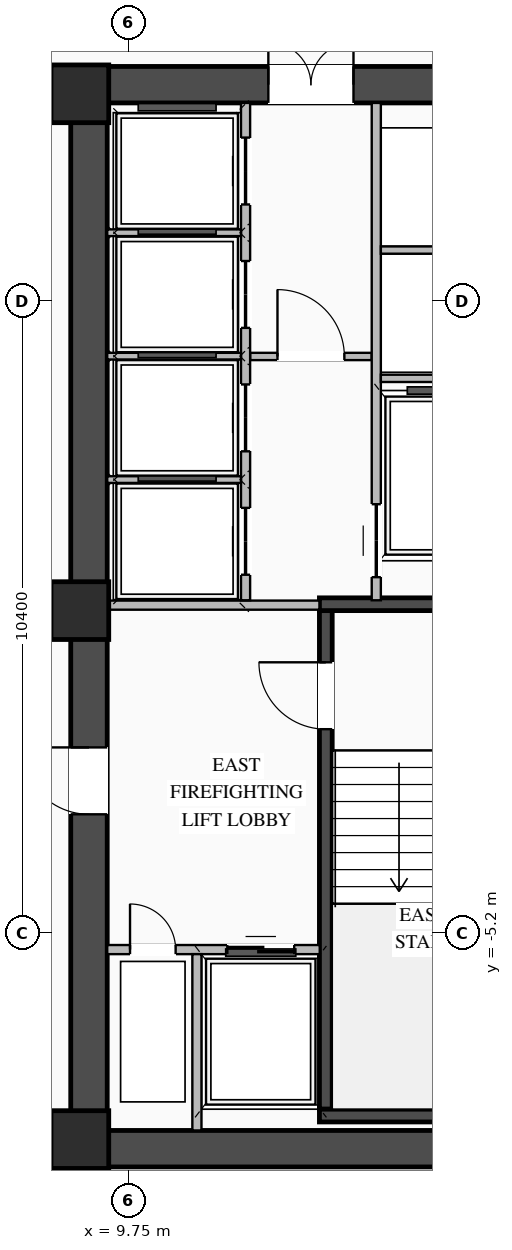
"""IFC4 building model, lengths in metres.
Left out: names, types, materials, properties, quantities, classifications, styles, units other than length and angle.
Written with IfcOpenShell. Run it as: python <this file> out.ifc"""

import sys

from ifc_helpers import new_model, si_unit, direction, frame, frame_2d, origin, origin_2d, place, context, subcontext, project, spatial, rectangle, extrude, element, fill, save


model = new_model("IFC4")
c1 = context("Model", 3, precision=1e-05, world=origin(), true_north=direction((0.0, 1.0)))
c2 = subcontext(c1, "Body", "Model", "MODEL_VIEW")
j1 = project(units=[si_unit("LENGTHUNIT", "METRE"), si_unit("PLANEANGLEUNIT", "RADIAN")], contexts=[c1])
p1 = place(None, origin())
s1 = spatial("IfcSite", under=j1, at=p1, CompositionType="ELEMENT")
p2 = place(p1, origin())
s2 = spatial("IfcBuilding", under=s1, at=p2, CompositionType="ELEMENT")
p3 = place(p2, frame((0.0, 0.0, 131.2)))
s3 = spatial("IfcBuildingStorey", under=s2, at=p3, CompositionType="ELEMENT", Elevation=131.2)
p4 = place(p3, frame((8.8, -8.75, 0.0), z_axis=(0.0, 0.0, 1.0), x_axis=(1.0, 0.0, 0.0)))
e1 = element("IfcWall", 1, at=p4, inside=s3, PredefinedType="SHEAR", context=c2, shape_type="SweptSolid", body=[
    extrude(rectangle(XDim=10.25, YDim=0.6, at=frame_2d((5.125, 0.0))), origin(), (0.0, 0.0, 1.0), 3.27),
])
p5 = place(p3, frame((8.8, 8.75, 0.0), z_axis=(0.0, 0.0, 1.0), x_axis=(1.0, 0.0, 0.0)))
e2 = element("IfcWall", 2, at=p5, inside=s3, PredefinedType="SHEAR", context=c2, shape_type="SweptSolid", body=[
    extrude(rectangle(XDim=10.25, YDim=0.6, at=frame_2d((5.125, 0.0))), origin(), (0.0, 0.0, 1.0), 3.27),
])
p6 = place(p5, frame((3.25, 0.0, 0.0)))
e3 = element("IfcOpeningElement", 3, at=p6, cuts=e2, PredefinedType="OPENING", context=c2, shape_type="SweptSolid", body=[
    extrude(rectangle(XDim=1.4, YDim=2.05, at=frame_2d((0.7, 1.025))), frame((0.0, 0.31, 0.0), z_axis=(0.0, -1.0, 0.0), x_axis=(1.0, 0.0, 0.0)), (0.0, 0.0, 1.0), 0.62),
])
p7 = place(p3, frame((9.1, -8.45, 0.0), z_axis=(0.0, 0.0, 1.0), x_axis=(0.0, 1.0, 0.0)))
e4 = element("IfcWall", 4, at=p7, inside=s3, PredefinedType="SHEAR", context=c2, shape_type="SweptSolid", body=[
    extrude(rectangle(XDim=16.9, YDim=0.6, at=frame_2d((8.45, 0.0))), origin(), (0.0, 0.0, 1.0), 3.27),
])
p8 = place(p7, frame((5.2, 0.0, 0.0)))
e5 = element("IfcOpeningElement", 5, at=p8, cuts=e4, PredefinedType="OPENING", context=c2, shape_type="SweptSolid", body=[
    extrude(rectangle(XDim=1.1, YDim=2.08, at=frame_2d((0.55, 1.04))), frame((0.0, 0.31, 0.0), z_axis=(0.0, -1.0, 0.0), x_axis=(1.0, 0.0, 0.0)), (0.0, 0.0, 1.0), 0.62),
])
p9 = place(p3, frame((12.995, -8.1, 0.0), z_axis=(0.0, 0.0, 1.0), x_axis=(0.0, 1.0, 0.0)))
e6 = element("IfcWall", 6, at=p9, inside=s3, PredefinedType="SHEAR", context=c2, shape_type="SweptSolid", body=[
    extrude(rectangle(XDim=8.2, YDim=0.21, at=frame_2d((4.1, 0.0))), origin(), (0.0, 0.0, 1.0), 3.27),
])
p10 = place(p9, frame((6.25, 0.0, 0.0)))
e7 = element("IfcOpeningElement", 7, at=p10, cuts=e6, PredefinedType="OPENING", context=c2, shape_type="SweptSolid", body=[
    extrude(rectangle(XDim=1.1, YDim=2.15, at=frame_2d((0.55, 1.075))), frame((0.0, 0.115, 0.0), z_axis=(0.0, -1.0, 0.0), x_axis=(1.0, 0.0, 0.0)), (0.0, 0.0, 1.0), 0.23),
])
for number, where, z_axis, x_axis in (
    (8, (12.89, -8.205, 0.0), (0.0, 0.0, 1.0), (1.0, 0.0, 0.0)),
    (9, (18.03, 0.205, 0.0), (0.0, 0.0, 1.0), (-1.0, 0.0, 0.0)),
):
    element("IfcWall", number, at=place(p3, frame(where, z_axis=z_axis, x_axis=x_axis)), inside=s3, PredefinedType="SHEAR", context=c2, shape_type="SweptSolid", body=[
        extrude(rectangle(XDim=5.14, YDim=0.21, at=frame_2d((2.57, 0.0))), origin(), (0.0, 0.0, 1.0), 3.27),
    ])
for number, where, z_axis, x_axis in (
    (10, (8.95, -8.6, 0.0), (0.0, 0.0, 1.0), (1.0, 0.0, 0.0)),
    (11, (8.95, 0.1, 0.0), (0.0, 0.0, 1.0), (1.0, 0.0, 0.0)),
    (12, (8.95, 8.6, 0.0), (0.0, 0.0, 1.0), (1.0, 0.0, 0.0)),
):
    element("IfcColumn", number, at=place(p3, frame(where, z_axis=z_axis, x_axis=x_axis)), inside=s3, PredefinedType="COLUMN", context=c2, shape_type="SweptSolid", body=[
        extrude(rectangle(XDim=0.95, YDim=0.95, at=origin_2d()), origin(), (0.0, 0.0, 1.0), 3.45),
    ])
p11 = place(p3, frame((9.4, -5.475, 0.0), z_axis=(0.0, 0.0, 1.0), x_axis=(1.0, 0.0, 0.0)))
e13 = element("IfcWall", 13, at=p11, inside=s3, PredefinedType="STANDARD", context=c2, shape_type="SweptSolid", body=[
    extrude(rectangle(XDim=3.495, YDim=0.15, at=frame_2d((1.748, 0.0))), origin(), (0.0, 0.0, 1.0), 3.25),
])
p12 = place(p11, frame((1.975, 0.0, 0.0)))
e14 = element("IfcOpeningElement", 14, at=p12, cuts=e13, PredefinedType="OPENING", context=c2, shape_type="SweptSolid", body=[
    extrude(rectangle(XDim=1.1, YDim=2.15, at=frame_2d((0.55, 1.075))), frame((0.0, 0.085, 0.0), z_axis=(0.0, -1.0, 0.0), x_axis=(1.0, 0.0, 0.0)), (0.0, 0.0, 1.0), 0.17),
])
p13 = place(p11, frame((0.375, 0.0, 0.0)))
e15 = element("IfcOpeningElement", 15, at=p13, cuts=e13, PredefinedType="OPENING", context=c2, shape_type="SweptSolid", body=[
    extrude(rectangle(XDim=0.75, YDim=2.05, at=frame_2d((0.375, 1.025))), frame((0.0, 0.085, 0.0), z_axis=(0.0, -1.0, 0.0), x_axis=(1.0, 0.0, 0.0)), (0.0, 0.0, 1.0), 0.17),
])
p14 = place(p3, frame((10.875, -8.45, 0.0), z_axis=(0.0, 0.0, 1.0), x_axis=(0.0, 1.0, 0.0)))
e16 = element("IfcWall", 16, at=p14, inside=s3, PredefinedType="STANDARD", context=c2, shape_type="SweptSolid", body=[
    extrude(rectangle(XDim=2.9, YDim=0.15, at=frame_2d((1.45, 0.0))), origin(), (0.0, 0.0, 1.0), 3.25),
])
p15 = place(p3, frame((9.4, 0.19, 0.0), z_axis=(0.0, 0.0, 1.0), x_axis=(1.0, 0.0, 0.0)))
e17 = element("IfcWall", 17, at=p15, inside=s3, PredefinedType="STANDARD", context=c2, shape_type="SweptSolid", body=[
    extrude(rectangle(XDim=3.49, YDim=0.15, at=frame_2d((1.745, 0.0))), origin(), (0.0, 0.0, 1.0), 2.645),
])
p16 = place(p3, frame((11.75, 4.28, 0.0), z_axis=(0.0, 0.0, 1.0), x_axis=(1.0, 0.0, 0.0)))
e18 = element("IfcWall", 18, at=p16, inside=s3, PredefinedType="STANDARD", context=c2, shape_type="SweptSolid", body=[
    extrude(rectangle(XDim=2.0, YDim=0.12, at=frame_2d((1.0, 0.0))), origin(), (0.0, 0.0, 1.0), 3.25),
])
p17 = place(p16, frame((0.45, 0.0, 0.0)))
e19 = element("IfcOpeningElement", 19, at=p17, cuts=e18, PredefinedType="OPENING", context=c2, shape_type="SweptSolid", body=[
    extrude(rectangle(XDim=1.1, YDim=2.1, at=frame_2d((0.55, 1.05))), frame((0.0, 0.07, 0.0), z_axis=(0.0, -1.0, 0.0), x_axis=(1.0, 0.0, 0.0)), (0.0, 0.0, 1.0), 0.14),
])
p18 = place(p3, frame((11.675, 0.27, 0.0), z_axis=(0.0, 0.0, 1.0), x_axis=(0.0, 1.0, 0.0)))
e20 = element("IfcWall", 20, at=p18, inside=s3, PredefinedType="STANDARD", context=c2, shape_type="SweptSolid", body=[
    extrude(rectangle(XDim=8.18, YDim=0.15, at=frame_2d((4.09, 0.0))), origin(), (0.0, 0.0, 1.0), 3.25),
])
p19 = place(p18, frame((0.42, 0.0, 0.0)))
e21 = element("IfcOpeningElement", 21, at=p19, cuts=e20, PredefinedType="OPENING", context=c2, shape_type="SweptSolid", body=[
    extrude(rectangle(XDim=1.1, YDim=2.1, at=frame_2d((0.55, 1.05))), frame((0.0, 0.085, 0.0), z_axis=(0.0, -1.0, 0.0), x_axis=(1.0, 0.0, 0.0)), (0.0, 0.0, 1.0), 0.17),
])
p20 = place(p18, frame((2.45, 0.0, 0.0)))
e22 = element("IfcOpeningElement", 22, at=p20, cuts=e20, PredefinedType="OPENING", context=c2, shape_type="SweptSolid", body=[
    extrude(rectangle(XDim=1.1, YDim=2.1, at=frame_2d((0.55, 1.05))), frame((0.0, 0.085, 0.0), z_axis=(0.0, -1.0, 0.0), x_axis=(1.0, 0.0, 0.0)), (0.0, 0.0, 1.0), 0.17),
])
p21 = place(p18, frame((4.48, 0.0, 0.0)))
e23 = element("IfcOpeningElement", 23, at=p21, cuts=e20, PredefinedType="OPENING", context=c2, shape_type="SweptSolid", body=[
    extrude(rectangle(XDim=1.1, YDim=2.1, at=frame_2d((0.55, 1.05))), frame((0.0, 0.085, 0.0), z_axis=(0.0, -1.0, 0.0), x_axis=(1.0, 0.0, 0.0)), (0.0, 0.0, 1.0), 0.17),
])
p22 = place(p18, frame((6.51, 0.0, 0.0)))
e24 = element("IfcOpeningElement", 24, at=p22, cuts=e20, PredefinedType="OPENING", context=c2, shape_type="SweptSolid", body=[
    extrude(rectangle(XDim=1.1, YDim=2.1, at=frame_2d((0.55, 1.05))), frame((0.0, 0.085, 0.0), z_axis=(0.0, -1.0, 0.0), x_axis=(1.0, 0.0, 0.0)), (0.0, 0.0, 1.0), 0.17),
])
for number, where, z_axis, x_axis in (
    (25, (9.4, 2.255, 0.0), (0.0, 0.0, 1.0), (1.0, 0.0, 0.0)),
    (26, (9.4, 4.285, 0.0), (0.0, 0.0, 1.0), (1.0, 0.0, 0.0)),
    (27, (9.4, 6.315, 0.0), (0.0, 0.0, 1.0), (1.0, 0.0, 0.0)),
):
    element("IfcWall", number, at=place(p3, frame(where, z_axis=z_axis, x_axis=x_axis)), inside=s3, PredefinedType="STANDARD", context=c2, shape_type="SweptSolid", body=[
        extrude(rectangle(XDim=2.2, YDim=0.11, at=frame_2d((1.1, 0.0))), origin(), (0.0, 0.0, 1.0), 3.25),
    ])
p23 = place(p3, frame((13.825, 0.27, 0.0), z_axis=(0.0, 0.0, 1.0), x_axis=(0.0, 1.0, 0.0)))
e28 = element("IfcWall", 28, at=p23, inside=s3, PredefinedType="STANDARD", context=c2, shape_type="SweptSolid", body=[
    extrude(rectangle(XDim=8.18, YDim=0.15, at=frame_2d((4.09, 0.0))), origin(), (0.0, 0.0, 1.0), 3.25),
])
p24 = place(p23, frame((0.38, 0.0, 0.0)))
e29 = element("IfcOpeningElement", 29, at=p24, cuts=e28, PredefinedType="OPENING", context=c2, shape_type="SweptSolid", body=[
    extrude(rectangle(XDim=1.2, YDim=2.1, at=frame_2d((0.6, 1.05))), frame((0.0, 0.085, 0.0), z_axis=(0.0, -1.0, 0.0), x_axis=(1.0, 0.0, 0.0)), (0.0, 0.0, 1.0), 0.17),
])
p25 = place(p3, frame((13.9, 3.92, 0.0), z_axis=(0.0, 0.0, 1.0), x_axis=(1.0, 0.0, 0.0)))
e30 = element("IfcWall", 30, at=p25, inside=s3, PredefinedType="STANDARD", context=c2, shape_type="SweptSolid", body=[
    extrude(rectangle(XDim=4.55, YDim=0.12, at=frame_2d((2.275, 0.0))), origin(), (0.0, 0.0, 1.0), 3.25),
])
p26 = place(p3, frame((13.9, 6.03, 0.0), z_axis=(0.0, 0.0, 1.0), x_axis=(1.0, 0.0, 0.0)))
e31 = element("IfcWall", 31, at=p26, inside=s3, PredefinedType="STANDARD", context=c2, shape_type="SweptSolid", body=[
    extrude(rectangle(XDim=2.1, YDim=0.12, at=frame_2d((1.05, 0.0))), origin(), (0.0, 0.0, 1.0), 3.25),
])
p27 = place(p10, origin())
e32 = element("IfcDoor", 32, at=p27, inside=s3, OperationType="SINGLE_SWING_RIGHT", PredefinedType="DOOR", context=c2, shape_type="SweptSolid", body=[
    extrude(rectangle(XDim=1.1, YDim=2.15, at=frame_2d((0.55, 1.075))), frame((0.0, 0.025, 0.0), z_axis=(0.0, -1.0, 0.0), x_axis=(1.0, 0.0, 0.0)), (0.0, 0.0, 1.0), 0.05),
])
fill(e7, e32)
p28 = place(p12, origin())
e33 = element("IfcDoor", 33, at=p28, inside=s3, OperationType="DOUBLE_DOOR_SLIDING", PredefinedType="DOOR", context=c2, shape_type="SweptSolid", body=[
    extrude(rectangle(XDim=1.1, YDim=2.15, at=frame_2d((0.55, 1.075))), frame((0.0, 0.025, 0.0), z_axis=(0.0, -1.0, 0.0), x_axis=(1.0, 0.0, 0.0)), (0.0, 0.0, 1.0), 0.05),
])
fill(e14, e33)
p29 = place(p13, origin())
e34 = element("IfcDoor", 34, at=p29, inside=s3, OperationType="SINGLE_SWING_LEFT", PredefinedType="DOOR", context=c2, shape_type="SweptSolid", body=[
    extrude(rectangle(XDim=0.75, YDim=2.05, at=frame_2d((0.375, 1.025))), frame((0.0, 0.025, 0.0), z_axis=(0.0, -1.0, 0.0), x_axis=(1.0, 0.0, 0.0)), (0.0, 0.0, 1.0), 0.05),
])
fill(e15, e34)
p30 = place(p8, origin())
e35 = element("IfcDoor", 35, at=p30, inside=s3, OperationType="SINGLE_SWING_RIGHT", PredefinedType="DOOR", context=c2, shape_type="SweptSolid", body=[
    extrude(rectangle(XDim=1.1, YDim=2.08, at=frame_2d((0.55, 1.04))), frame((0.0, -0.205, 0.0), z_axis=(0.0, -1.0, 0.0), x_axis=(1.0, 0.0, 0.0)), (0.0, 0.0, 1.0), 0.05),
])
fill(e5, e35)
p31 = place(p17, origin())
e36 = element("IfcDoor", 36, at=p31, inside=s3, OperationType="SINGLE_SWING_LEFT", PredefinedType="DOOR", context=c2, shape_type="SweptSolid", body=[
    extrude(rectangle(XDim=1.1, YDim=2.1, at=frame_2d((0.55, 1.05))), frame((0.0, 0.025, 0.0), z_axis=(0.0, -1.0, 0.0), x_axis=(1.0, 0.0, 0.0)), (0.0, 0.0, 1.0), 0.05),
])
fill(e19, e36)
p32 = place(p6, origin())
e37 = element("IfcDoor", 37, at=p32, inside=s3, OperationType="DOUBLE_DOOR_SINGLE_SWING", PredefinedType="DOOR", context=c2, shape_type="SweptSolid", body=[
    extrude(rectangle(XDim=1.4, YDim=2.05, at=frame_2d((0.7, 1.025))), frame((0.0, 0.245, 0.0), z_axis=(0.0, -1.0, 0.0), x_axis=(1.0, 0.0, 0.0)), (0.0, 0.0, 1.0), 0.05),
])
fill(e3, e37)
p33 = place(p19, origin())
e38 = element("IfcDoor", 38, at=p33, inside=s3, OperationType="DOUBLE_DOOR_SLIDING", PredefinedType="DOOR", context=c2, shape_type="SweptSolid", body=[
    extrude(rectangle(XDim=1.1, YDim=2.1, at=frame_2d((0.55, 1.05))), frame((0.0, 0.025, 0.0), z_axis=(0.0, -1.0, 0.0), x_axis=(1.0, 0.0, 0.0)), (0.0, 0.0, 1.0), 0.05),
])
fill(e21, e38)
p34 = place(p20, origin())
e39 = element("IfcDoor", 39, at=p34, inside=s3, OperationType="DOUBLE_DOOR_SLIDING", PredefinedType="DOOR", context=c2, shape_type="SweptSolid", body=[
    extrude(rectangle(XDim=1.1, YDim=2.1, at=frame_2d((0.55, 1.05))), frame((0.0, 0.025, 0.0), z_axis=(0.0, -1.0, 0.0), x_axis=(1.0, 0.0, 0.0)), (0.0, 0.0, 1.0), 0.05),
])
fill(e22, e39)
p35 = place(p21, origin())
e40 = element("IfcDoor", 40, at=p35, inside=s3, OperationType="DOUBLE_DOOR_SLIDING", PredefinedType="DOOR", context=c2, shape_type="SweptSolid", body=[
    extrude(rectangle(XDim=1.1, YDim=2.1, at=frame_2d((0.55, 1.05))), frame((0.0, 0.025, 0.0), z_axis=(0.0, -1.0, 0.0), x_axis=(1.0, 0.0, 0.0)), (0.0, 0.0, 1.0), 0.05),
])
fill(e23, e40)
p36 = place(p22, origin())
e41 = element("IfcDoor", 41, at=p36, inside=s3, OperationType="DOUBLE_DOOR_SLIDING", PredefinedType="DOOR", context=c2, shape_type="SweptSolid", body=[
    extrude(rectangle(XDim=1.1, YDim=2.1, at=frame_2d((0.55, 1.05))), frame((0.0, 0.025, 0.0), z_axis=(0.0, -1.0, 0.0), x_axis=(1.0, 0.0, 0.0)), (0.0, 0.0, 1.0), 0.05),
])
fill(e24, e41)
p37 = place(p24, origin())
e42 = element("IfcDoor", 42, at=p37, inside=s3, OperationType="DOUBLE_DOOR_SLIDING", PredefinedType="DOOR", context=c2, shape_type="SweptSolid", body=[
    extrude(rectangle(XDim=1.2, YDim=2.1, at=frame_2d((0.6, 1.05))), frame((0.0, 0.025, 0.0), z_axis=(0.0, -1.0, 0.0), x_axis=(1.0, 0.0, 0.0)), (0.0, 0.0, 1.0), 0.05),
])
fill(e29, e42)
save(model, sys.argv[1])
